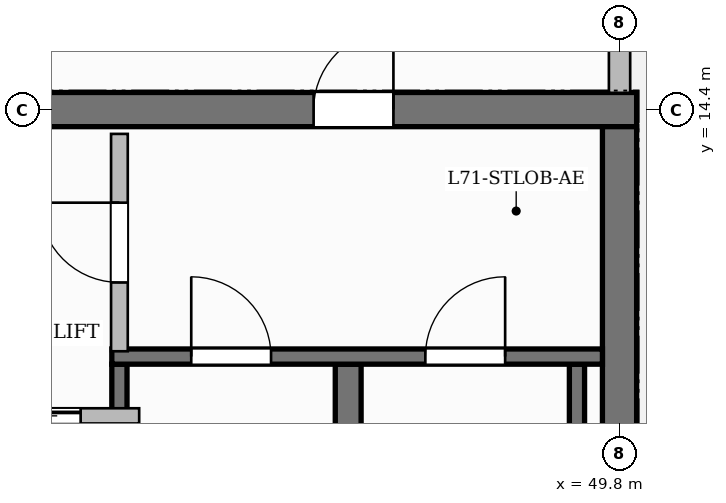
"""IFC4 building model, lengths in metres.
Left out: names, types, materials, properties, quantities, classifications, styles, units other than length and angle.
Written with IfcOpenShell. Run it as: python <this file> out.ifc"""

import sys

from ifc_helpers import new_model, si_unit, direction, frame, frame_2d, origin, place, context, subcontext, project, spatial, rectangle, extrude, source, transform, mapped, element, fill, save


model = new_model("IFC4")
c1 = context("Model", 3, precision=1e-05, world=origin(), true_north=direction((0.0, 1.0)))
c2 = subcontext(c1, "Body", "Model", "MODEL_VIEW")
j1 = project(units=[si_unit("LENGTHUNIT", "METRE"), si_unit("PLANEANGLEUNIT", "RADIAN")], contexts=[c1])
p1 = place(None, origin())
s1 = spatial("IfcSite", under=j1, at=p1, CompositionType="ELEMENT")
p2 = place(p1, origin())
s2 = spatial("IfcBuilding", under=s1, at=p2, CompositionType="ELEMENT")
p3 = place(p2, frame((0.0, 0.0, 282.75)))
s3 = spatial("IfcBuildingStorey", under=s2, at=p3, CompositionType="ELEMENT", Elevation=282.75)
p4 = place(p3, frame((34.575, 14.4, 0.0), z_axis=(0.0, 0.0, 1.0), x_axis=(1.0, 0.0, 0.0)))
e1 = element("IfcWall", 1, at=p4, inside=s3, PredefinedType="SHEAR", context=c2, shape_type="SweptSolid", body=[
    extrude(rectangle(XDim=15.45, YDim=0.45, at=frame_2d((7.725, 0.0))), origin(), (0.0, 0.0, 1.0), 3.85),
])
p5 = place(p4, frame((5.355, 0.0, 0.0)))
e2 = element("IfcOpeningElement", 2, at=p5, cuts=e1, PredefinedType="OPENING", context=c2, shape_type="SweptSolid", body=[
    extrude(rectangle(XDim=1.5, YDim=2.2, at=frame_2d((0.75, 1.1))), frame((0.0, 0.235, 0.0), z_axis=(0.0, -1.0, 0.0), x_axis=(1.0, 0.0, 0.0)), (0.0, 0.0, 1.0), 0.47),
])
p6 = place(p4, frame((1.57, 0.0, 0.0)))
e3 = element("IfcOpeningElement", 3, at=p6, cuts=e1, PredefinedType="OPENING", context=c2, shape_type="SweptSolid", body=[
    extrude(rectangle(XDim=1.05, YDim=2.15, at=frame_2d((0.525, 1.075))), frame((0.0, 0.235, 0.0), z_axis=(0.0, -1.0, 0.0), x_axis=(1.0, 0.0, 0.0)), (0.0, 0.0, 1.0), 0.47),
])
p7 = place(p4, frame((11.2, 0.0, 0.0)))
e4 = element("IfcOpeningElement", 4, at=p7, cuts=e1, PredefinedType="OPENING", context=c2, shape_type="SweptSolid", body=[
    extrude(rectangle(XDim=1.05, YDim=2.15, at=frame_2d((0.525, 1.075))), frame((0.0, 0.235, 0.0), z_axis=(0.0, -1.0, 0.0), x_axis=(1.0, 0.0, 0.0)), (0.0, 0.0, 1.0), 0.47),
])
p8 = place(p3, frame((49.8, 3.825, 0.0), z_axis=(0.0, 0.0, 1.0), x_axis=(0.0, 1.0, 0.0)))
e5 = element("IfcWall", 5, at=p8, inside=s3, PredefinedType="SHEAR", context=c2, shape_type="SweptSolid", body=[
    extrude(rectangle(XDim=10.35, YDim=0.45, at=frame_2d((5.175, 0.0))), origin(), (0.0, 0.0, 1.0), 3.85),
])
p9 = place(p3, frame((43.22, 4.1, 0.0), z_axis=(0.0, 0.0, 1.0), x_axis=(0.0, 1.0, 0.0)))
e6 = element("IfcWall", 6, at=p9, inside=s3, PredefinedType="SHEAR", context=c2, shape_type="SweptSolid", body=[
    extrude(rectangle(XDim=6.95, YDim=0.2, at=frame_2d((3.475, 0.0))), origin(), (0.0, 0.0, 1.0), 3.85),
])
p10 = place(p3, frame((46.23, 4.1, 0.0), z_axis=(0.0, 0.0, 1.0), x_axis=(0.0, 1.0, 0.0)))
e7 = element("IfcWall", 7, at=p10, inside=s3, PredefinedType="SHEAR", context=c2, shape_type="SweptSolid", body=[
    extrude(rectangle(XDim=6.95, YDim=0.34, at=frame_2d((3.475, 0.0))), origin(), (0.0, 0.0, 1.0), 3.85),
])
p11 = place(p3, frame((49.24, 4.1, 0.0), z_axis=(0.0, 0.0, 1.0), x_axis=(0.0, 1.0, 0.0)))
e8 = element("IfcWall", 8, at=p11, inside=s3, PredefinedType="SHEAR", context=c2, shape_type="SweptSolid", body=[
    extrude(rectangle(XDim=6.95, YDim=0.2, at=frame_2d((3.475, 0.0))), origin(), (0.0, 0.0, 1.0), 3.85),
])
p12 = place(p3, frame((43.12, 11.15, 0.0), z_axis=(0.0, 0.0, 1.0), x_axis=(1.0, 0.0, 0.0)))
e9 = element("IfcWall", 9, at=p12, inside=s3, PredefinedType="SHEAR", context=c2, shape_type="SweptSolid", body=[
    extrude(rectangle(XDim=6.455, YDim=0.2, at=frame_2d((3.228, 0.0))), origin(), (0.0, 0.0, 1.0), 3.85),
])
p13 = place(p12, frame((1.045, 0.0, 0.0)))
e10 = element("IfcOpeningElement", 10, at=p13, cuts=e9, PredefinedType="OPENING", context=c2, shape_type="SweptSolid", body=[
    extrude(rectangle(XDim=1.05, YDim=2.2, at=frame_2d((0.525, 1.1))), frame((0.0, 0.11, 0.0), z_axis=(0.0, -1.0, 0.0), x_axis=(1.0, 0.0, 0.0)), (0.0, 0.0, 1.0), 0.22),
])
p14 = place(p12, frame((4.125, 0.0, 0.0)))
e11 = element("IfcOpeningElement", 11, at=p14, cuts=e9, PredefinedType="OPENING", context=c2, shape_type="SweptSolid", body=[
    extrude(rectangle(XDim=1.05, YDim=2.2, at=frame_2d((0.525, 1.1))), frame((0.0, 0.11, 0.0), z_axis=(0.0, -1.0, 0.0), x_axis=(1.0, 0.0, 0.0)), (0.0, 0.0, 1.0), 0.22),
])
p15 = place(p3, frame((43.22, 11.22, 0.0), z_axis=(0.0, 0.0, 1.0), x_axis=(0.0, 1.0, 0.0)))
e12 = element("IfcWall", 12, at=p15, inside=s3, PredefinedType="PARTITIONING", context=c2, shape_type="SweptSolid", body=[
    extrude(rectangle(XDim=2.86, YDim=0.22, at=frame_2d((1.43, 0.0))), origin(), (0.0, 0.0, 1.0), 3.6),
])
p16 = place(p15, frame((0.905, 0.0, 0.0)))
e13 = element("IfcOpeningElement", 13, at=p16, cuts=e12, PredefinedType="OPENING", context=c2, shape_type="SweptSolid", body=[
    extrude(rectangle(XDim=1.05, YDim=2.15, at=frame_2d((0.525, 1.075))), frame((0.0, 0.12, 0.0), z_axis=(0.0, -1.0, 0.0), x_axis=(1.0, 0.0, 0.0)), (0.0, 0.0, 1.0), 0.24),
])
p17 = place(p3, frame((40.84, 10.37, 0.0), z_axis=(0.0, 0.0, 1.0), x_axis=(1.0, 0.0, 0.0)))
e14 = element("IfcWall", 14, at=p17, inside=s3, PredefinedType="PARTITIONING", context=c2, shape_type="SweptSolid", body=[
    extrude(rectangle(XDim=2.64, YDim=0.2, at=frame_2d((1.32, 0.0))), origin(), (0.0, 0.0, 1.0), 3.6),
])
p18 = place(p17, frame((0.77, 0.0, 0.0)))
e15 = element("IfcOpeningElement", 15, at=p18, cuts=e14, PredefinedType="OPENING", context=c2, shape_type="SweptSolid", body=[
    extrude(rectangle(XDim=1.1, YDim=2.2, at=frame_2d((0.55, 1.1))), frame((0.0, 0.11, 0.0), z_axis=(0.0, -1.0, 0.0), x_axis=(1.0, 0.0, 0.0)), (0.0, 0.0, 1.0), 0.22),
])
p19 = place(p3, frame((49.8, 14.62, 0.0), z_axis=(0.0, 0.0, 1.0), x_axis=(0.0, 1.0, 0.0)))
e16 = element("IfcWall", 16, at=p19, inside=s3, PredefinedType="SOLIDWALL", context=c2, shape_type="SweptSolid", body=[
    extrude(rectangle(XDim=6.93, YDim=0.28, at=frame_2d((3.465, 0.0))), origin(), (0.0, 0.0, 1.0), 3.185),
])
p20 = place(p19, frame((1.889, 0.0, 0.0)))
e17 = element("IfcOpeningElement", 17, at=p20, cuts=e16, PredefinedType="OPENING", context=c2, shape_type="SweptSolid", body=[
    extrude(rectangle(XDim=1.2, YDim=2.2, at=frame_2d((0.6, 1.1))), frame((0.0, 0.15, 0.0), z_axis=(0.0, -1.0, 0.0), x_axis=(1.0, 0.0, 0.0)), (0.0, 0.0, 1.0), 0.3),
])
p21 = place(p19, frame((3.884, 0.0, 0.8)))
e18 = element("IfcOpeningElement", 18, at=p21, cuts=e16, PredefinedType="OPENING", context=c2, shape_type="SweptSolid", body=[
    extrude(rectangle(XDim=1.8, YDim=1.85, at=frame_2d((0.9, 0.925))), frame((0.0, 0.15, 0.0), z_axis=(0.0, -1.0, 0.0), x_axis=(1.0, 0.0, 0.0)), (0.0, 0.0, 1.0), 0.3),
])
m1 = source(origin(), c2, "Body", "SweptSolid", [
    extrude(rectangle(XDim=1.05, YDim=2.2, at=frame_2d((0.525, 1.1))), frame((0.0, 0.025, 0.0), z_axis=(0.0, -1.0, 0.0), x_axis=(1.0, 0.0, 0.0)), (0.0, 0.0, 1.0), 0.05),
])
p22 = place(p13, origin())
e19 = element("IfcDoor", 19, at=p22, inside=s3, OperationType="SINGLE_SWING_LEFT", PredefinedType="DOOR", context=c2, shape_type="MappedRepresentation", body=[
    mapped(m1, transform((0.0, 0.0, 0.0), scale=1.0)),
])
fill(e10, e19)
p23 = place(p14, origin())
e20 = element("IfcDoor", 20, at=p23, inside=s3, OperationType="SINGLE_SWING_RIGHT", PredefinedType="DOOR", context=c2, shape_type="MappedRepresentation", body=[
    mapped(m1, transform((0.0, 0.0, 0.0), scale=1.0)),
])
fill(e11, e20)
m2 = source(origin(), c2, "Body", "SweptSolid", [
    extrude(rectangle(XDim=1.05, YDim=2.15, at=frame_2d((0.525, 1.075))), frame((0.0, 0.025, 0.0), z_axis=(0.0, -1.0, 0.0), x_axis=(1.0, 0.0, 0.0)), (0.0, 0.0, 1.0), 0.05),
])
p24 = place(p16, origin())
e21 = element("IfcDoor", 21, at=p24, inside=s3, OperationType="SINGLE_SWING_RIGHT", PredefinedType="DOOR", context=c2, shape_type="MappedRepresentation", body=[
    mapped(m2, transform((0.0, 0.0, 0.0), scale=1.0)),
])
fill(e13, e21)
p25 = place(p7, origin())
e22 = element("IfcDoor", 22, at=p25, inside=s3, OperationType="SINGLE_SWING_RIGHT", PredefinedType="DOOR", context=c2, shape_type="MappedRepresentation", body=[
    mapped(m2, transform((0.0, 0.0, 0.0), scale=1.0)),
])
fill(e4, e22)
m3 = source(origin(), c2, "Body", "SweptSolid", [
    extrude(rectangle(XDim=1.1, YDim=2.2, at=frame_2d((0.55, 1.1))), frame((0.0, 0.025, 0.0), z_axis=(0.0, -1.0, 0.0), x_axis=(1.0, 0.0, 0.0)), (0.0, 0.0, 1.0), 0.05),
])
p26 = place(p18, origin())
e23 = element("IfcDoor", 23, at=p26, inside=s3, OperationType="SLIDING_TO_LEFT", PredefinedType="DOOR", context=c2, shape_type="MappedRepresentation", body=[
    mapped(m3, transform((0.0, 0.0, 0.0), scale=1.0)),
])
fill(e15, e23)
save(model, sys.argv[1])
